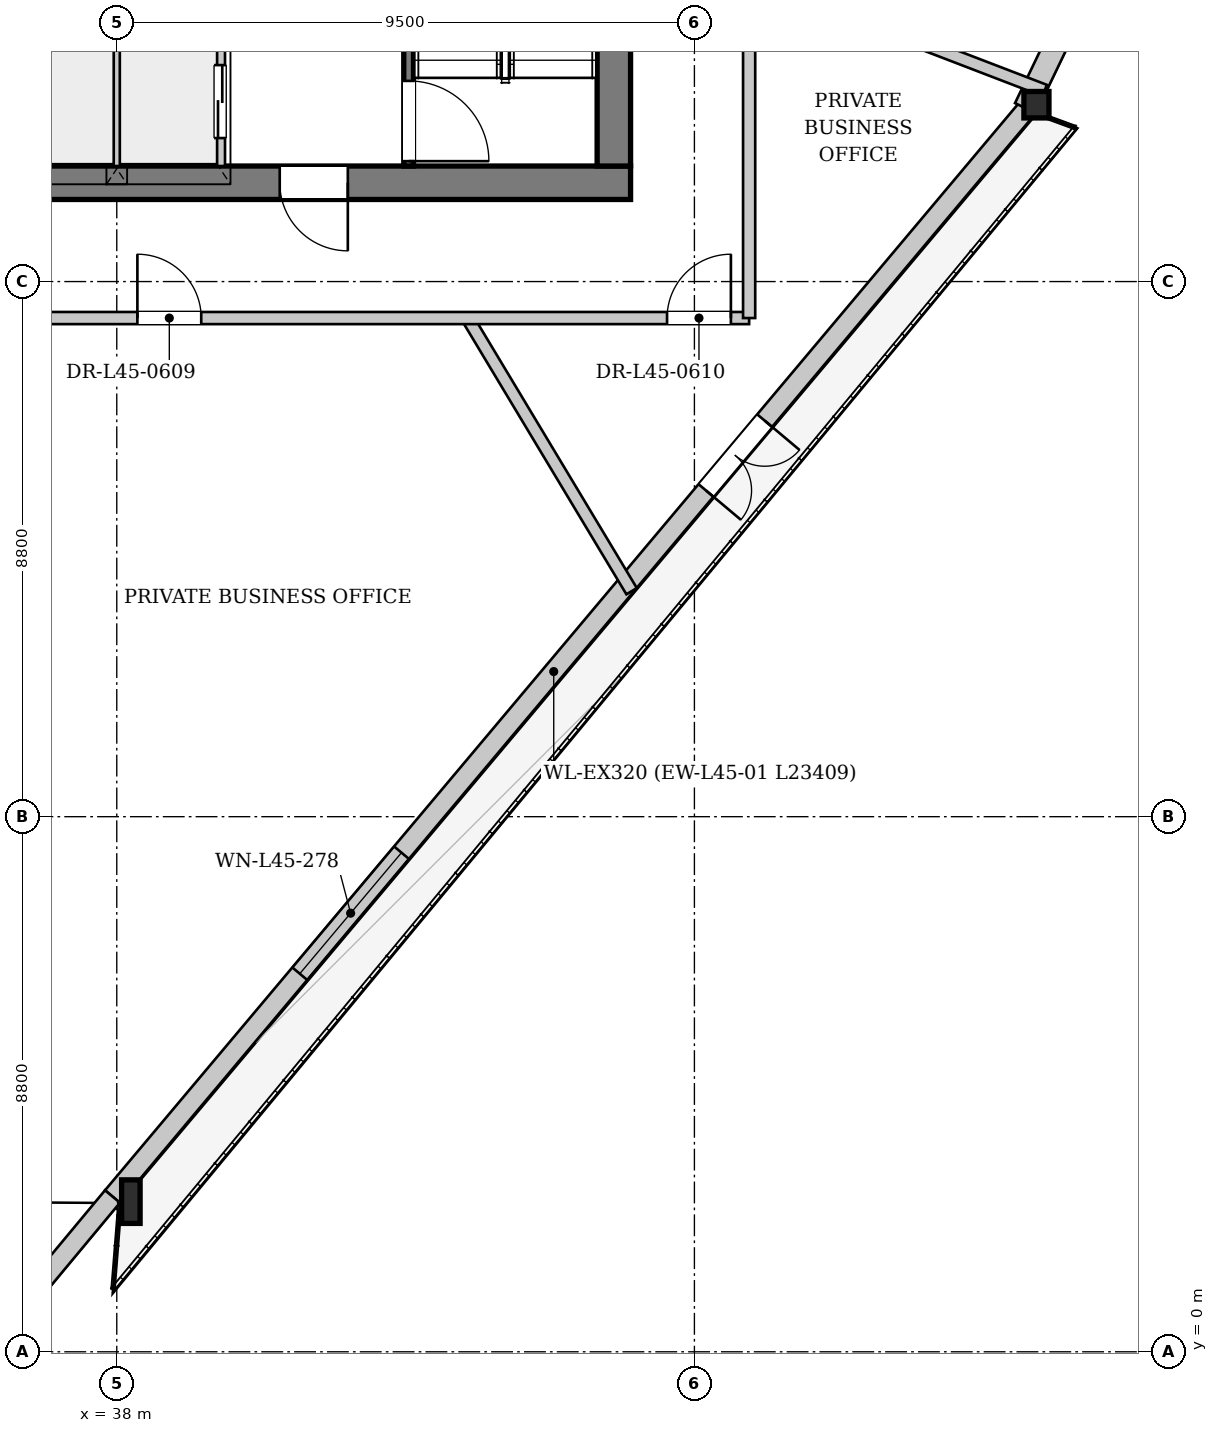
"""IFC4 building model, lengths in metres.
Left out: names, types, materials, properties, quantities, classifications, styles, units other than length and angle.
Written with IfcOpenShell. Run it as: python <this file> out.ifc"""

import sys

from ifc_helpers import new_model, si_unit, direction, frame, frame_2d, origin, origin_2d, place, context, subcontext, project, spatial, rectangle, i_section, extrude, source, transform, mapped, element, fill, save


model = new_model("IFC4")
c1 = context("Model", 3, precision=1e-05, world=origin(), true_north=direction((0.0, 1.0)))
c2 = subcontext(c1, "Body", "Model", "MODEL_VIEW")
j1 = project(units=[si_unit("LENGTHUNIT", "METRE"), si_unit("PLANEANGLEUNIT", "RADIAN")], contexts=[c1])
p1 = place(None, origin())
s1 = spatial("IfcSite", under=j1, at=p1, CompositionType="ELEMENT")
p2 = place(p1, origin())
s2 = spatial("IfcBuilding", under=s1, at=p2, CompositionType="ELEMENT")
p3 = place(p2, frame((0.0, 0.0, 171.45)))
s3 = spatial("IfcBuildingStorey", under=s2, at=p3, CompositionType="ELEMENT", Elevation=171.45)
m1 = source(origin(), c2, "Body", "SweptSolid", [
    extrude(i_section(OverallWidth=0.304, OverallDepth=0.716, WebThickness=0.021, FlangeThickness=0.04, at=origin_2d()), origin(), (0.0, 0.0, 1.0), 3.404),
])
p4 = place(p3, frame((38.052, 2.451, 0.0), z_axis=(0.105425268125, 0.01082939829, 0.99436826024), x_axis=(-0.102183402757, 0.994765576506, 0.0)))
e1 = element("IfcColumn", 1, at=p4, inside=s3, PredefinedType="COLUMN", context=c2, shape_type="MappedRepresentation", body=[
    mapped(m1, transform((0.0, 0.0, 0.0), x_axis=(1.0, 0.0, 0.0), y_axis=(0.0, 1.0, 0.0), z_axis=(0.0, 0.0, 1.0), scale=1.0)),
])
m2 = source(origin(), c2, "Body", "SweptSolid", [
    extrude(i_section(OverallWidth=0.412, OverallDepth=0.435, WebThickness=0.031, FlangeThickness=0.05, at=origin_2d()), origin(), (0.0, 0.0, 1.0), 3.396),
])
p5 = place(p3, frame((53.115, 20.37, 0.0), z_axis=(0.005750660519, 0.081443729594, 0.996661351119), x_axis=(-0.997516467009, 0.07043364286, 0.0)))
e2 = element("IfcColumn", 2, at=p5, inside=s3, PredefinedType="COLUMN", context=c2, shape_type="MappedRepresentation", body=[
    mapped(m2, transform((0.0, 0.0, 0.0), x_axis=(1.0, 0.0, 0.0), y_axis=(0.0, 1.0, 0.0), z_axis=(0.0, 0.0, 1.0), scale=1.0)),
])
p6 = place(p3, frame((52.993, 20.473, 0.0), z_axis=(0.0, 0.0, 1.0), x_axis=(-0.643470383852, -0.765471008664, 0.0)))
e3 = element("IfcWall", 3, at=p6, inside=s3, PredefinedType="SOLIDWALL", context=c2, shape_type="SweptSolid", body=[
    extrude(rectangle(XDim=23.409, YDim=0.32, at=frame_2d((11.705, 0.0))), origin(), (0.0, 0.0, 1.0), 2.722),
])
p7 = place(p6, frame((6.741, 0.0, 0.0)))
e4 = element("IfcOpeningElement", 4, at=p7, cuts=e3, PredefinedType="OPENING", context=c2, shape_type="SweptSolid", body=[
    extrude(rectangle(XDim=1.5, YDim=2.3, at=frame_2d((0.75, 1.15))), frame((0.0, 0.17, 0.0), z_axis=(0.0, -1.0, 0.0), x_axis=(1.0, 0.0, 0.0)), (0.0, 0.0, 1.0), 0.34),
])
p8 = place(p6, frame((16.023, 0.0, 0.252)))
e5 = element("IfcOpeningElement", 5, at=p8, cuts=e3, PredefinedType="OPENING", context=c2, shape_type="SweptSolid", body=[
    extrude(rectangle(XDim=2.6, YDim=2.35, at=frame_2d((1.3, 1.175))), frame((0.0, 0.17, 0.0), z_axis=(0.0, -1.0, 0.0), x_axis=(1.0, 0.0, 0.0)), (0.0, 0.0, 1.0), 0.34),
])
p9 = place(p3, frame((37.929, 2.553, 0.0), z_axis=(0.0, 0.0, 1.0), x_axis=(-0.639311542503, -0.768947821132, 0.0)))
e6 = element("IfcWall", 6, at=p9, inside=s3, PredefinedType="SOLIDWALL", context=c2, shape_type="SweptSolid", body=[
    extrude(rectangle(XDim=2.147, YDim=0.32, at=frame_2d((1.073, 0.0))), origin(), (0.0, 0.0, 1.0), 2.722),
])
p10 = place(p3, frame((63.077, 41.555, 0.0), z_axis=(0.0, 0.0, 1.0), x_axis=(-0.432876854569, -0.901453065211, 0.0)))
e7 = element("IfcWall", 7, at=p10, inside=s3, PredefinedType="SOLIDWALL", context=c2, shape_type="SweptSolid", body=[
    extrude(rectangle(XDim=23.409, YDim=0.38, at=frame_2d((11.705, 0.0))), origin(), (0.0, 0.0, 1.0), 2.722),
])
p11 = place(p10, frame((5.955, 0.0, 0.65)))
e8 = element("IfcOpeningElement", 8, at=p11, cuts=e7, PredefinedType="OPENING", context=c2, shape_type="SweptSolid", body=[
    extrude(rectangle(XDim=1.2, YDim=1.5, at=frame_2d((0.6, 0.75))), frame((0.0, 0.2, 0.0), z_axis=(0.0, -1.0, 0.0), x_axis=(1.0, 0.0, 0.0)), (0.0, 0.0, 1.0), 0.4),
])
p12 = place(p10, frame((16.255, 0.0, 0.65)))
e9 = element("IfcOpeningElement", 9, at=p12, cuts=e7, PredefinedType="OPENING", context=c2, shape_type="SweptSolid", body=[
    extrude(rectangle(XDim=1.2, YDim=1.5, at=frame_2d((0.6, 0.75))), frame((0.0, 0.2, 0.0), z_axis=(0.0, -1.0, 0.0), x_axis=(1.0, 0.0, 0.0)), (0.0, 0.0, 1.0), 0.4),
])
p13 = place(p3, frame((46.45, 19.225, 0.0), z_axis=(0.0, 0.0, 1.0), x_axis=(-1.0, 0.0, 0.0)))
e10 = element("IfcWall", 10, at=p13, inside=s3, PredefinedType="SHEAR", context=c2, shape_type="SweptSolid", body=[
    extrude(rectangle(XDim=16.9, YDim=0.55, at=frame_2d((8.45, 0.0))), origin(), (0.0, 0.0, 1.0), 3.33),
])
p14 = place(p13, frame((4.65, 0.0, 0.0)))
e11 = element("IfcOpeningElement", 11, at=p14, cuts=e10, PredefinedType="OPENING", context=c2, shape_type="SweptSolid", body=[
    extrude(rectangle(XDim=1.12, YDim=2.25, at=frame_2d((0.56, 1.125))), frame((0.0, 0.285, 0.0), z_axis=(0.0, -1.0, 0.0), x_axis=(1.0, 0.0, 0.0)), (0.0, 0.0, 1.0), 0.57),
])
p15 = place(p13, frame((11.15, 0.0, 0.0)))
e12 = element("IfcOpeningElement", 12, at=p15, cuts=e10, PredefinedType="OPENING", context=c2, shape_type="SweptSolid", body=[
    extrude(rectangle(XDim=1.12, YDim=2.25, at=frame_2d((0.56, 1.125))), frame((0.0, 0.285, 0.0), z_axis=(0.0, -1.0, 0.0), x_axis=(1.0, 0.0, 0.0)), (0.0, 0.0, 1.0), 0.57),
])
p16 = place(p3, frame((46.175, 33.7, 0.0), z_axis=(0.0, 0.0, 1.0), x_axis=(0.0, -1.0, 0.0)))
e13 = element("IfcWall", 13, at=p16, inside=s3, PredefinedType="SHEAR", context=c2, shape_type="SweptSolid", body=[
    extrude(rectangle(XDim=14.2, YDim=0.55, at=frame_2d((7.1, 0.0))), origin(), (0.0, 0.0, 1.0), 3.33),
])
p17 = place(p16, frame((5.18, 0.0, 0.0)))
e14 = element("IfcOpeningElement", 14, at=p17, cuts=e13, PredefinedType="OPENING", context=c2, shape_type="SweptSolid", body=[
    extrude(rectangle(XDim=1.6, YDim=2.2, at=frame_2d((0.8, 1.1))), frame((0.0, 0.285, 0.0), z_axis=(0.0, -1.0, 0.0), x_axis=(1.0, 0.0, 0.0)), (0.0, 0.0, 1.0), 0.57),
])
p18 = place(p16, frame((2.05, 0.0, 0.0)))
e15 = element("IfcOpeningElement", 15, at=p18, cuts=e13, PredefinedType="OPENING", context=c2, shape_type="SweptSolid", body=[
    extrude(rectangle(XDim=0.95, YDim=2.1, at=frame_2d((0.475, 1.05))), frame((0.0, 0.285, 0.0), z_axis=(0.0, -1.0, 0.0), x_axis=(1.0, 0.0, 0.0)), (0.0, 0.0, 1.0), 0.57),
])
p19 = place(p3, frame((42.8, 26.96, 0.0), z_axis=(0.0, 0.0, 1.0), x_axis=(0.0, -1.0, 0.0)))
e16 = element("IfcWall", 16, at=p19, inside=s3, PredefinedType="PARTITIONING", context=c2, shape_type="SweptSolid", body=[
    extrude(rectangle(XDim=7.46, YDim=0.16, at=frame_2d((3.73, 0.0))), origin(), (0.0, 0.0, 1.0), 3.33),
])
p20 = place(p19, frame((6.06, 0.0, 0.0)))
e17 = element("IfcOpeningElement", 17, at=p20, cuts=e16, PredefinedType="OPENING", context=c2, shape_type="SweptSolid", body=[
    extrude(rectangle(XDim=1.32, YDim=2.2, at=frame_2d((0.66, 1.1))), frame((0.0, 0.09, 0.0), z_axis=(0.0, -1.0, 0.0), x_axis=(1.0, 0.0, 0.0)), (0.0, 0.0, 1.0), 0.18),
])
p21 = place(p3, frame((39.7, 24.28, 0.0), z_axis=(0.0, 0.0, 1.0), x_axis=(0.0, -1.0, 0.0)))
e18 = element("IfcWall", 18, at=p21, inside=s3, PredefinedType="PARTITIONING", context=c2, shape_type="SweptSolid", body=[
    extrude(rectangle(XDim=4.78, YDim=0.16, at=frame_2d((2.39, 0.0))), origin(), (0.0, 0.0, 1.0), 3.33),
])
p22 = place(p21, frame((3.12, 0.0, 0.0)))
e19 = element("IfcOpeningElement", 19, at=p22, cuts=e18, PredefinedType="OPENING", context=c2, shape_type="SweptSolid", body=[
    extrude(rectangle(XDim=1.2, YDim=2.2, at=frame_2d((0.6, 1.1))), frame((0.0, 0.09, 0.0), z_axis=(0.0, -1.0, 0.0), x_axis=(1.0, 0.0, 0.0)), (0.0, 0.0, 1.0), 0.18),
])
p23 = place(p3, frame((38.0, 19.5, 0.0), z_axis=(0.0, 0.0, 1.0), x_axis=(0.0, 1.0, 0.0)))
e20 = element("IfcWall", 20, at=p23, inside=s3, PredefinedType="PARTITIONING", context=c2, shape_type="SweptSolid", body=[
    extrude(rectangle(XDim=2.46, YDim=0.125, at=frame_2d((1.23, 0.0))), origin(), (0.0, 0.0, 1.0), 3.33),
])
p24 = place(p3, frame((43.768, 17.0, 0.0), z_axis=(0.0, 0.0, 1.0), x_axis=(0.515030046978, -0.857172124319, 0.0)))
e21 = element("IfcWall", 21, at=p24, inside=s3, PredefinedType="PARTITIONING", context=c2, shape_type="SweptSolid", body=[
    extrude(rectangle(XDim=5.24, YDim=0.2, at=frame_2d((2.62, 0.0))), origin(), (0.0, 0.0, 1.0), 3.33),
])
p25 = place(p3, frame((48.4, 22.608, 0.0), z_axis=(0.0, 0.0, 1.0), x_axis=(0.933576236836, -0.358378863794, 0.0)))
e22 = element("IfcWall", 22, at=p25, inside=s3, PredefinedType="PARTITIONING", context=c2, shape_type="SweptSolid", body=[
    extrude(rectangle(XDim=5.207, YDim=0.2, at=frame_2d((2.604, 0.0))), origin(), (0.0, 0.0, 1.0), 2.865),
])
p26 = place(p3, frame((27.6, 17.0, 0.0), z_axis=(0.0, 0.0, 1.0), x_axis=(1.0, 0.0, 0.0)))
e23 = element("IfcWall", 23, at=p26, inside=s3, PredefinedType="PARTITIONING", context=c2, shape_type="SweptSolid", body=[
    extrude(rectangle(XDim=20.8, YDim=0.2, at=frame_2d((10.4, 0.0))), origin(), (0.0, 0.0, 1.0), 3.33),
])
p27 = place(p26, frame((4.334, 0.0, 0.0)))
e24 = element("IfcOpeningElement", 24, at=p27, cuts=e23, PredefinedType="OPENING", context=c2, shape_type="SweptSolid", body=[
    extrude(rectangle(XDim=1.05, YDim=2.2, at=frame_2d((0.525, 1.1))), frame((0.0, 0.11, 0.0), z_axis=(0.0, -1.0, 0.0), x_axis=(1.0, 0.0, 0.0)), (0.0, 0.0, 1.0), 0.22),
])
p28 = place(p26, frame((10.739, 0.0, 0.0)))
e25 = element("IfcOpeningElement", 25, at=p28, cuts=e23, PredefinedType="OPENING", context=c2, shape_type="SweptSolid", body=[
    extrude(rectangle(XDim=1.05, YDim=2.2, at=frame_2d((0.525, 1.1))), frame((0.0, 0.11, 0.0), z_axis=(0.0, -1.0, 0.0), x_axis=(1.0, 0.0, 0.0)), (0.0, 0.0, 1.0), 0.22),
])
p29 = place(p26, frame((19.45, 0.0, 0.0)))
e26 = element("IfcOpeningElement", 26, at=p29, cuts=e23, PredefinedType="OPENING", context=c2, shape_type="SweptSolid", body=[
    extrude(rectangle(XDim=1.05, YDim=2.2, at=frame_2d((0.525, 1.1))), frame((0.0, 0.11, 0.0), z_axis=(0.0, -1.0, 0.0), x_axis=(1.0, 0.0, 0.0)), (0.0, 0.0, 1.0), 0.22),
])
p30 = place(p3, frame((48.4, 17.0, 0.0), z_axis=(0.0, 0.0, 1.0), x_axis=(0.0, 1.0, 0.0)))
e27 = element("IfcWall", 27, at=p30, inside=s3, PredefinedType="PARTITIONING", context=c2, shape_type="SweptSolid", body=[
    extrude(rectangle(XDim=19.2, YDim=0.2, at=frame_2d((9.6, 0.0))), origin(), (0.0, 0.0, 1.0), 3.33),
])
p31 = place(p30, frame((8.665, 0.0, 0.0)))
e28 = element("IfcOpeningElement", 28, at=p31, cuts=e27, PredefinedType="OPENING", context=c2, shape_type="SweptSolid", body=[
    extrude(rectangle(XDim=1.05, YDim=2.2, at=frame_2d((0.525, 1.1))), frame((0.0, 0.11, 0.0), z_axis=(0.0, -1.0, 0.0), x_axis=(1.0, 0.0, 0.0)), (0.0, 0.0, 1.0), 0.22),
])
m3 = source(origin(), c2, "Body", "SweptSolid", [
    extrude(rectangle(XDim=1.5, YDim=2.3, at=frame_2d((0.75, 1.15))), frame((0.0, 0.025, 0.0), z_axis=(0.0, -1.0, 0.0), x_axis=(1.0, 0.0, 0.0)), (0.0, 0.0, 1.0), 0.05),
])
p32 = place(p7, origin())
e29 = element("IfcDoor", 29, at=p32, inside=s3, OperationType="DOUBLE_DOOR_SINGLE_SWING", PredefinedType="DOOR", context=c2, shape_type="MappedRepresentation", body=[
    mapped(m3, transform((0.0, 0.0, 0.0), x_axis=(1.0, 0.0, 0.0), y_axis=(0.0, 1.0, 0.0), z_axis=(0.0, 0.0, 1.0), scale=1.0)),
])
fill(e4, e29)
m4 = source(origin(), c2, "Body", "SweptSolid", [
    extrude(rectangle(XDim=2.6, YDim=2.35, at=frame_2d((1.3, 1.175))), frame((0.0, 0.03, 0.0), z_axis=(0.0, -1.0, 0.0), x_axis=(1.0, 0.0, 0.0)), (0.0, 0.0, 1.0), 0.06),
])
p33 = place(p8, origin())
e30 = element("IfcWindow", 30, at=p33, inside=s3, PartitioningType="SINGLE_PANEL", PredefinedType="WINDOW", context=c2, shape_type="MappedRepresentation", body=[
    mapped(m4, transform((0.0, 0.0, 0.0), x_axis=(1.0, 0.0, 0.0), y_axis=(0.0, 1.0, 0.0), z_axis=(0.0, 0.0, 1.0), scale=1.0)),
])
fill(e5, e30)
m5 = source(origin(), c2, "Body", "SweptSolid", [
    extrude(rectangle(XDim=1.12, YDim=2.25, at=frame_2d((0.56, 1.125))), frame((0.0, 0.025, 0.0), z_axis=(0.0, -1.0, 0.0), x_axis=(1.0, 0.0, 0.0)), (0.0, 0.0, 1.0), 0.05),
])
p34 = place(p14, origin())
e31 = element("IfcDoor", 31, at=p34, inside=s3, OperationType="SINGLE_SWING_LEFT", PredefinedType="DOOR", context=c2, shape_type="MappedRepresentation", body=[
    mapped(m5, transform((0.0, 0.0, 0.0), x_axis=(1.0, 0.0, 0.0), y_axis=(0.0, 1.0, 0.0), z_axis=(0.0, 0.0, 1.0), scale=1.0)),
])
fill(e11, e31)
m6 = source(origin(), c2, "Body", "SweptSolid", [
    extrude(rectangle(XDim=1.32, YDim=2.2, at=frame_2d((0.66, 1.1))), frame((0.0, 0.025, 0.0), z_axis=(0.0, -1.0, 0.0), x_axis=(1.0, 0.0, 0.0)), (0.0, 0.0, 1.0), 0.05),
])
p35 = place(p20, origin())
e32 = element("IfcDoor", 32, at=p35, inside=s3, OperationType="SINGLE_SWING_RIGHT", PredefinedType="DOOR", context=c2, shape_type="MappedRepresentation", body=[
    mapped(m6, transform((0.0, 0.0, 0.0), x_axis=(1.0, 0.0, 0.0), y_axis=(0.0, 1.0, 0.0), z_axis=(0.0, 0.0, 1.0), scale=1.0)),
])
fill(e17, e32)
m7 = source(origin(), c2, "Body", "SweptSolid", [
    extrude(rectangle(XDim=1.2, YDim=2.2, at=frame_2d((0.6, 1.1))), frame((0.0, 0.025, 0.0), z_axis=(0.0, -1.0, 0.0), x_axis=(1.0, 0.0, 0.0)), (0.0, 0.0, 1.0), 0.05),
])
p36 = place(p22, origin())
e33 = element("IfcDoor", 33, at=p36, inside=s3, OperationType="DOUBLE_DOOR_SLIDING", PredefinedType="DOOR", context=c2, shape_type="MappedRepresentation", body=[
    mapped(m7, transform((0.0, 0.0, 0.0), x_axis=(1.0, 0.0, 0.0), y_axis=(0.0, 1.0, 0.0), z_axis=(0.0, 0.0, 1.0), scale=1.0)),
])
fill(e19, e33)
m8 = source(origin(), c2, "Body", "SweptSolid", [
    extrude(rectangle(XDim=1.05, YDim=2.2, at=frame_2d((0.525, 1.1))), frame((0.0, 0.025, 0.0), z_axis=(0.0, -1.0, 0.0), x_axis=(1.0, 0.0, 0.0)), (0.0, 0.0, 1.0), 0.05),
])
p37 = place(p28, origin())
e34 = element("IfcDoor", 34, at=p37, inside=s3, OperationType="SINGLE_SWING_LEFT", PredefinedType="DOOR", context=c2, shape_type="MappedRepresentation", body=[
    mapped(m8, transform((0.0, 0.0, 0.0), x_axis=(1.0, 0.0, 0.0), y_axis=(0.0, 1.0, 0.0), z_axis=(0.0, 0.0, 1.0), scale=1.0)),
])
fill(e25, e34)
p38 = place(p29, origin())
e35 = element("IfcDoor", 35, at=p38, inside=s3, OperationType="SINGLE_SWING_RIGHT", PredefinedType="DOOR", context=c2, shape_type="MappedRepresentation", body=[
    mapped(m8, transform((0.0, 0.0, 0.0), x_axis=(1.0, 0.0, 0.0), y_axis=(0.0, 1.0, 0.0), z_axis=(0.0, 0.0, 1.0), scale=1.0)),
])
fill(e26, e35)
save(model, sys.argv[1])
